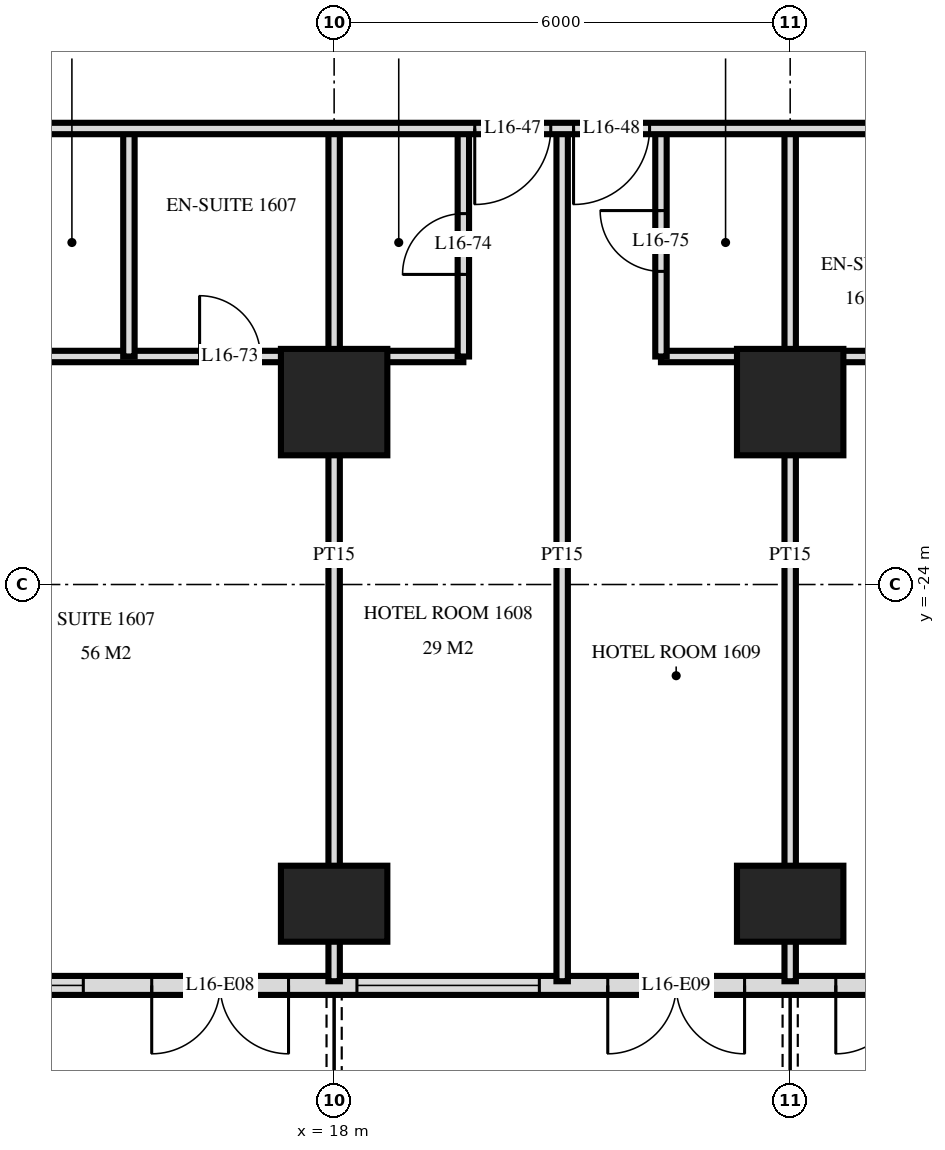
"""IFC4 building model, lengths in metres.
Left out: names, types, materials, properties, quantities, classifications, styles, units other than length and angle.
Written with IfcOpenShell. Run it as: python <this file> out.ifc"""

import sys

from ifc_helpers import new_model, si_unit, direction, frame, frame_2d, origin, origin_2d, place, context, subcontext, project, spatial, rectangle, extrude, element, fill, save


model = new_model("IFC4")
c1 = context("Model", 3, precision=1e-05, world=origin(), true_north=direction((0.0, 1.0)))
c2 = subcontext(c1, "Body", "Model", "MODEL_VIEW")
j1 = project(units=[si_unit("LENGTHUNIT", "METRE"), si_unit("PLANEANGLEUNIT", "RADIAN")], contexts=[c1])
p1 = place(None, origin())
s1 = spatial("IfcSite", under=j1, at=p1, CompositionType="ELEMENT")
p2 = place(p1, origin())
s2 = spatial("IfcBuilding", under=s1, at=p2, CompositionType="ELEMENT")
p3 = place(p2, frame((0.0, 0.0, 67.2)))
s3 = spatial("IfcBuildingStorey", under=s2, at=p3, CompositionType="ELEMENT", Elevation=67.2)
p4 = place(p3, frame((18.0, -28.2, 0.0), z_axis=(0.0, 0.0, 1.0), x_axis=(1.0, 0.0, 0.0)))
e1 = element("IfcColumn", 1, at=p4, inside=s3, PredefinedType="COLUMN", context=c2, shape_type="SweptSolid", body=[
    extrude(rectangle(XDim=1.4, YDim=1.0, at=origin_2d()), origin(), (0.0, 0.0, 1.0), 3.6),
])
p5 = place(p3, frame((18.0, -21.6, 0.0), z_axis=(0.0, 0.0, 1.0), x_axis=(1.0, 0.0, 0.0)))
e2 = element("IfcColumn", 2, at=p5, inside=s3, PredefinedType="COLUMN", context=c2, shape_type="SweptSolid", body=[
    extrude(rectangle(XDim=1.4, YDim=1.4, at=origin_2d()), origin(), (0.0, 0.0, 1.0), 3.6),
])
p6 = place(p3, frame((24.0, -28.2, 0.0), z_axis=(0.0, 0.0, 1.0), x_axis=(1.0, 0.0, 0.0)))
e3 = element("IfcColumn", 3, at=p6, inside=s3, PredefinedType="COLUMN", context=c2, shape_type="SweptSolid", body=[
    extrude(rectangle(XDim=1.4, YDim=1.0, at=origin_2d()), origin(), (0.0, 0.0, 1.0), 3.6),
])
p7 = place(p3, frame((24.0, -21.6, 0.0), z_axis=(0.0, 0.0, 1.0), x_axis=(1.0, 0.0, 0.0)))
e4 = element("IfcColumn", 4, at=p7, inside=s3, PredefinedType="COLUMN", context=c2, shape_type="SweptSolid", body=[
    extrude(rectangle(XDim=1.4, YDim=1.4, at=origin_2d()), origin(), (0.0, 0.0, 1.0), 3.6),
])
p8 = place(p3, frame((-28.775, -29.275, 0.0), z_axis=(0.0, 0.0, 1.0), x_axis=(1.0, 0.0, 0.0)))
e5 = element("IfcWall", 5, at=p8, inside=s3, PredefinedType="SOLIDWALL", context=c2, shape_type="SweptSolid", body=[
    extrude(rectangle(XDim=57.551, YDim=0.25, at=frame_2d((28.775, 0.0))), origin(), (0.0, 0.0, 1.0), 3.32),
])
p9 = place(p8, frame((0.575, 0.0, 0.0)))
e6 = element("IfcOpeningElement", 6, at=p9, cuts=e5, PredefinedType="OPENING", context=c2, shape_type="SweptSolid", body=[
    extrude(rectangle(XDim=1.8, YDim=2.4, at=frame_2d((0.9, 1.2))), frame((0.0, 0.135, 0.0), z_axis=(0.0, -1.0, 0.0), x_axis=(1.0, 0.0, 0.0)), (0.0, 0.0, 1.0), 0.27),
])
p10 = place(p8, frame((5.075, 0.0, 0.3)))
e7 = element("IfcOpeningElement", 7, at=p10, cuts=e5, PredefinedType="OPENING", context=c2, shape_type="SweptSolid", body=[
    extrude(rectangle(XDim=2.4, YDim=2.1, at=frame_2d((1.2, 1.05))), frame((0.0, 0.135, 0.0), z_axis=(0.0, -1.0, 0.0), x_axis=(1.0, 0.0, 0.0)), (0.0, 0.0, 1.0), 0.27),
])
p11 = place(p8, frame((8.375, 0.0, 0.0)))
e8 = element("IfcOpeningElement", 8, at=p11, cuts=e5, PredefinedType="OPENING", context=c2, shape_type="SweptSolid", body=[
    extrude(rectangle(XDim=1.8, YDim=2.4, at=frame_2d((0.9, 1.2))), frame((0.0, 0.135, 0.0), z_axis=(0.0, -1.0, 0.0), x_axis=(1.0, 0.0, 0.0)), (0.0, 0.0, 1.0), 0.27),
])
p12 = place(p8, frame((11.375, 0.0, 0.0)))
e9 = element("IfcOpeningElement", 9, at=p12, cuts=e5, PredefinedType="OPENING", context=c2, shape_type="SweptSolid", body=[
    extrude(rectangle(XDim=1.8, YDim=2.4, at=frame_2d((0.9, 1.2))), frame((0.0, 0.135, 0.0), z_axis=(0.0, -1.0, 0.0), x_axis=(1.0, 0.0, 0.0)), (0.0, 0.0, 1.0), 0.27),
])
p13 = place(p8, frame((14.075, 0.0, 0.3)))
e10 = element("IfcOpeningElement", 10, at=p13, cuts=e5, PredefinedType="OPENING", context=c2, shape_type="SweptSolid", body=[
    extrude(rectangle(XDim=2.4, YDim=2.1, at=frame_2d((1.2, 1.05))), frame((0.0, 0.135, 0.0), z_axis=(0.0, -1.0, 0.0), x_axis=(1.0, 0.0, 0.0)), (0.0, 0.0, 1.0), 0.27),
])
p14 = place(p8, frame((17.375, 0.0, 0.0)))
e11 = element("IfcOpeningElement", 11, at=p14, cuts=e5, PredefinedType="OPENING", context=c2, shape_type="SweptSolid", body=[
    extrude(rectangle(XDim=1.8, YDim=2.4, at=frame_2d((0.9, 1.2))), frame((0.0, 0.135, 0.0), z_axis=(0.0, -1.0, 0.0), x_axis=(1.0, 0.0, 0.0)), (0.0, 0.0, 1.0), 0.27),
])
p15 = place(p8, frame((20.075, 0.0, 0.3)))
e12 = element("IfcOpeningElement", 12, at=p15, cuts=e5, PredefinedType="OPENING", context=c2, shape_type="SweptSolid", body=[
    extrude(rectangle(XDim=2.4, YDim=2.1, at=frame_2d((1.2, 1.05))), frame((0.0, 0.135, 0.0), z_axis=(0.0, -1.0, 0.0), x_axis=(1.0, 0.0, 0.0)), (0.0, 0.0, 1.0), 0.27),
])
p16 = place(p8, frame((23.075, 0.0, 0.3)))
e13 = element("IfcOpeningElement", 13, at=p16, cuts=e5, PredefinedType="OPENING", context=c2, shape_type="SweptSolid", body=[
    extrude(rectangle(XDim=2.4, YDim=2.1, at=frame_2d((1.2, 1.05))), frame((0.0, 0.135, 0.0), z_axis=(0.0, -1.0, 0.0), x_axis=(1.0, 0.0, 0.0)), (0.0, 0.0, 1.0), 0.27),
])
p17 = place(p8, frame((26.375, 0.0, 0.0)))
e14 = element("IfcOpeningElement", 14, at=p17, cuts=e5, PredefinedType="OPENING", context=c2, shape_type="SweptSolid", body=[
    extrude(rectangle(XDim=1.8, YDim=2.4, at=frame_2d((0.9, 1.2))), frame((0.0, 0.135, 0.0), z_axis=(0.0, -1.0, 0.0), x_axis=(1.0, 0.0, 0.0)), (0.0, 0.0, 1.0), 0.27),
])
p18 = place(p8, frame((29.375, 0.0, 0.0)))
e15 = element("IfcOpeningElement", 15, at=p18, cuts=e5, PredefinedType="OPENING", context=c2, shape_type="SweptSolid", body=[
    extrude(rectangle(XDim=1.8, YDim=2.4, at=frame_2d((0.9, 1.2))), frame((0.0, 0.135, 0.0), z_axis=(0.0, -1.0, 0.0), x_axis=(1.0, 0.0, 0.0)), (0.0, 0.0, 1.0), 0.27),
])
p19 = place(p8, frame((32.075, 0.0, 0.3)))
e16 = element("IfcOpeningElement", 16, at=p19, cuts=e5, PredefinedType="OPENING", context=c2, shape_type="SweptSolid", body=[
    extrude(rectangle(XDim=2.4, YDim=2.1, at=frame_2d((1.2, 1.05))), frame((0.0, 0.135, 0.0), z_axis=(0.0, -1.0, 0.0), x_axis=(1.0, 0.0, 0.0)), (0.0, 0.0, 1.0), 0.27),
])
p20 = place(p8, frame((35.375, 0.0, 0.0)))
e17 = element("IfcOpeningElement", 17, at=p20, cuts=e5, PredefinedType="OPENING", context=c2, shape_type="SweptSolid", body=[
    extrude(rectangle(XDim=1.8, YDim=2.4, at=frame_2d((0.9, 1.2))), frame((0.0, 0.135, 0.0), z_axis=(0.0, -1.0, 0.0), x_axis=(1.0, 0.0, 0.0)), (0.0, 0.0, 1.0), 0.27),
])
p21 = place(p8, frame((38.075, 0.0, 0.3)))
e18 = element("IfcOpeningElement", 18, at=p21, cuts=e5, PredefinedType="OPENING", context=c2, shape_type="SweptSolid", body=[
    extrude(rectangle(XDim=2.4, YDim=2.1, at=frame_2d((1.2, 1.05))), frame((0.0, 0.135, 0.0), z_axis=(0.0, -1.0, 0.0), x_axis=(1.0, 0.0, 0.0)), (0.0, 0.0, 1.0), 0.27),
])
p22 = place(p8, frame((41.075, 0.0, 0.3)))
e19 = element("IfcOpeningElement", 19, at=p22, cuts=e5, PredefinedType="OPENING", context=c2, shape_type="SweptSolid", body=[
    extrude(rectangle(XDim=2.4, YDim=2.1, at=frame_2d((1.2, 1.05))), frame((0.0, 0.135, 0.0), z_axis=(0.0, -1.0, 0.0), x_axis=(1.0, 0.0, 0.0)), (0.0, 0.0, 1.0), 0.27),
])
p23 = place(p8, frame((44.375, 0.0, 0.0)))
e20 = element("IfcOpeningElement", 20, at=p23, cuts=e5, PredefinedType="OPENING", context=c2, shape_type="SweptSolid", body=[
    extrude(rectangle(XDim=1.8, YDim=2.4, at=frame_2d((0.9, 1.2))), frame((0.0, 0.135, 0.0), z_axis=(0.0, -1.0, 0.0), x_axis=(1.0, 0.0, 0.0)), (0.0, 0.0, 1.0), 0.27),
])
p24 = place(p8, frame((47.075, 0.0, 0.3)))
e21 = element("IfcOpeningElement", 21, at=p24, cuts=e5, PredefinedType="OPENING", context=c2, shape_type="SweptSolid", body=[
    extrude(rectangle(XDim=2.4, YDim=2.1, at=frame_2d((1.2, 1.05))), frame((0.0, 0.135, 0.0), z_axis=(0.0, -1.0, 0.0), x_axis=(1.0, 0.0, 0.0)), (0.0, 0.0, 1.0), 0.27),
])
p25 = place(p8, frame((50.375, 0.0, 0.0)))
e22 = element("IfcOpeningElement", 22, at=p25, cuts=e5, PredefinedType="OPENING", context=c2, shape_type="SweptSolid", body=[
    extrude(rectangle(XDim=1.8, YDim=2.4, at=frame_2d((0.9, 1.2))), frame((0.0, 0.135, 0.0), z_axis=(0.0, -1.0, 0.0), x_axis=(1.0, 0.0, 0.0)), (0.0, 0.0, 1.0), 0.27),
])
p26 = place(p8, frame((53.375, 0.0, 0.0)))
e23 = element("IfcOpeningElement", 23, at=p26, cuts=e5, PredefinedType="OPENING", context=c2, shape_type="SweptSolid", body=[
    extrude(rectangle(XDim=1.8, YDim=2.4, at=frame_2d((0.9, 1.2))), frame((0.0, 0.135, 0.0), z_axis=(0.0, -1.0, 0.0), x_axis=(1.0, 0.0, 0.0)), (0.0, 0.0, 1.0), 0.27),
])
p27 = place(p3, frame((24.0, -29.22, 0.0), z_axis=(0.0, 0.0, 1.0), x_axis=(0.0, 1.0, 0.0)))
e24 = element("IfcWall", 24, at=p27, inside=s3, PredefinedType="PARTITIONING", context=c2, shape_type="SweptSolid", body=[
    extrude(rectangle(XDim=11.22, YDim=0.15, at=frame_2d((5.61, 0.0))), origin(), (0.0, 0.0, 1.0), 3.32),
])
p28 = place(p3, frame((22.3, -21.0, 0.0), z_axis=(0.0, 0.0, 1.0), x_axis=(0.0, 1.0, 0.0)))
e25 = element("IfcWall", 25, at=p28, inside=s3, PredefinedType="PARTITIONING", context=c2, shape_type="SweptSolid", body=[
    extrude(rectangle(XDim=3.0, YDim=0.15, at=frame_2d((1.5, 0.0))), origin(), (0.0, 0.0, 1.0), 3.32),
])
p29 = place(p28, frame((1.12, 0.0, 0.0)))
e26 = element("IfcOpeningElement", 26, at=p29, cuts=e25, PredefinedType="OPENING", context=c2, shape_type="SweptSolid", body=[
    extrude(rectangle(XDim=0.8, YDim=2.1, at=frame_2d((0.4, 1.05))), frame((0.0, 0.085, 0.0), z_axis=(0.0, -1.0, 0.0), x_axis=(1.0, 0.0, 0.0)), (0.0, 0.0, 1.0), 0.17),
])
p30 = place(p3, frame((21.0, -29.22, 0.0), z_axis=(0.0, 0.0, 1.0), x_axis=(0.0, 1.0, 0.0)))
e27 = element("IfcWall", 27, at=p30, inside=s3, PredefinedType="PARTITIONING", context=c2, shape_type="SweptSolid", body=[
    extrude(rectangle(XDim=11.22, YDim=0.15, at=frame_2d((5.61, 0.0))), origin(), (0.0, 0.0, 1.0), 3.32),
])
p31 = place(p3, frame((19.7, -21.0, 0.0), z_axis=(0.0, 0.0, 1.0), x_axis=(0.0, 1.0, 0.0)))
e28 = element("IfcWall", 28, at=p31, inside=s3, PredefinedType="PARTITIONING", context=c2, shape_type="SweptSolid", body=[
    extrude(rectangle(XDim=3.0, YDim=0.15, at=frame_2d((1.5, 0.0))), origin(), (0.0, 0.0, 1.0), 3.32),
])
p32 = place(p31, frame((1.08, 0.0, 0.0)))
e29 = element("IfcOpeningElement", 29, at=p32, cuts=e28, PredefinedType="OPENING", context=c2, shape_type="SweptSolid", body=[
    extrude(rectangle(XDim=0.8, YDim=2.1, at=frame_2d((0.4, 1.05))), frame((0.0, 0.085, 0.0), z_axis=(0.0, -1.0, 0.0), x_axis=(1.0, 0.0, 0.0)), (0.0, 0.0, 1.0), 0.17),
])
p33 = place(p3, frame((18.0, -29.22, 0.0), z_axis=(0.0, 0.0, 1.0), x_axis=(0.0, 1.0, 0.0)))
e30 = element("IfcWall", 30, at=p33, inside=s3, PredefinedType="PARTITIONING", context=c2, shape_type="SweptSolid", body=[
    extrude(rectangle(XDim=11.22, YDim=0.15, at=frame_2d((5.61, 0.0))), origin(), (0.0, 0.0, 1.0), 3.32),
])
p34 = place(p3, frame((15.3, -21.0, 0.0), z_axis=(0.0, 0.0, 1.0), x_axis=(0.0, 1.0, 0.0)))
e31 = element("IfcWall", 31, at=p34, inside=s3, PredefinedType="PARTITIONING", context=c2, shape_type="SweptSolid", body=[
    extrude(rectangle(XDim=3.0, YDim=0.15, at=frame_2d((1.5, 0.0))), origin(), (0.0, 0.0, 1.0), 3.32),
])
p35 = place(p3, frame((13.8, -21.0, 0.0), z_axis=(0.0, 0.0, 1.0), x_axis=(1.0, 0.0, 0.0)))
e32 = element("IfcWall", 32, at=p35, inside=s3, PredefinedType="PARTITIONING", context=c2, shape_type="SweptSolid", body=[
    extrude(rectangle(XDim=5.9, YDim=0.15, at=frame_2d((2.95, 0.0))), origin(), (0.0, 0.0, 1.0), 3.32),
])
p36 = place(p35, frame((2.43, 0.0, 0.0)))
e33 = element("IfcOpeningElement", 33, at=p36, cuts=e32, PredefinedType="OPENING", context=c2, shape_type="SweptSolid", body=[
    extrude(rectangle(XDim=0.8, YDim=2.1, at=frame_2d((0.4, 1.05))), frame((0.0, 0.085, 0.0), z_axis=(0.0, -1.0, 0.0), x_axis=(1.0, 0.0, 0.0)), (0.0, 0.0, 1.0), 0.17),
])
p37 = place(p3, frame((22.3, -21.0, 0.0), z_axis=(0.0, 0.0, 1.0), x_axis=(1.0, 0.0, 0.0)))
e34 = element("IfcWall", 34, at=p37, inside=s3, PredefinedType="PARTITIONING", context=c2, shape_type="SweptSolid", body=[
    extrude(rectangle(XDim=4.7, YDim=0.15, at=frame_2d((2.35, 0.0))), origin(), (0.0, 0.0, 1.0), 3.32),
])
p38 = place(p3, frame((-33.12, -18.0, 0.0), z_axis=(0.0, 0.0, 1.0), x_axis=(1.0, 0.0, 0.0)))
e35 = element("IfcWall", 35, at=p38, inside=s3, PredefinedType="PARTITIONING", context=c2, shape_type="SweptSolid", body=[
    extrude(rectangle(XDim=66.24, YDim=0.15, at=frame_2d((33.12, 0.0))), origin(), (0.0, 0.0, 1.0), 3.32),
])
p39 = place(p38, frame((15.27, 0.0, 0.0)))
e36 = element("IfcOpeningElement", 36, at=p39, cuts=e35, PredefinedType="OPENING", context=c2, shape_type="SweptSolid", body=[
    extrude(rectangle(XDim=1.0, YDim=2.1, at=frame_2d((0.5, 1.05))), frame((0.0, 0.085, 0.0), z_axis=(0.0, -1.0, 0.0), x_axis=(1.0, 0.0, 0.0)), (0.0, 0.0, 1.0), 0.17),
])
p40 = place(p38, frame((21.22, 0.0, 0.0)))
e37 = element("IfcOpeningElement", 37, at=p40, cuts=e35, PredefinedType="OPENING", context=c2, shape_type="SweptSolid", body=[
    extrude(rectangle(XDim=1.0, YDim=2.1, at=frame_2d((0.5, 1.05))), frame((0.0, 0.085, 0.0), z_axis=(0.0, -1.0, 0.0), x_axis=(1.0, 0.0, 0.0)), (0.0, 0.0, 1.0), 0.17),
])
p41 = place(p38, frame((24.27, 0.0, 0.0)))
e38 = element("IfcOpeningElement", 38, at=p41, cuts=e35, PredefinedType="OPENING", context=c2, shape_type="SweptSolid", body=[
    extrude(rectangle(XDim=1.0, YDim=2.1, at=frame_2d((0.5, 1.05))), frame((0.0, 0.085, 0.0), z_axis=(0.0, -1.0, 0.0), x_axis=(1.0, 0.0, 0.0)), (0.0, 0.0, 1.0), 0.17),
])
p42 = place(p38, frame((30.97, 0.0, 0.0)))
e39 = element("IfcOpeningElement", 39, at=p42, cuts=e35, PredefinedType="OPENING", context=c2, shape_type="SweptSolid", body=[
    extrude(rectangle(XDim=1.0, YDim=2.1, at=frame_2d((0.5, 1.05))), frame((0.0, 0.085, 0.0), z_axis=(0.0, -1.0, 0.0), x_axis=(1.0, 0.0, 0.0)), (0.0, 0.0, 1.0), 0.17),
])
p43 = place(p38, frame((40.42, 0.0, 0.0)))
e40 = element("IfcOpeningElement", 40, at=p43, cuts=e35, PredefinedType="OPENING", context=c2, shape_type="SweptSolid", body=[
    extrude(rectangle(XDim=1.0, YDim=2.1, at=frame_2d((0.5, 1.05))), frame((0.0, 0.085, 0.0), z_axis=(0.0, -1.0, 0.0), x_axis=(1.0, 0.0, 0.0)), (0.0, 0.0, 1.0), 0.17),
])
p44 = place(p38, frame((43.97, 0.0, 0.0)))
e41 = element("IfcOpeningElement", 41, at=p44, cuts=e35, PredefinedType="OPENING", context=c2, shape_type="SweptSolid", body=[
    extrude(rectangle(XDim=1.0, YDim=2.1, at=frame_2d((0.5, 1.05))), frame((0.0, 0.085, 0.0), z_axis=(0.0, -1.0, 0.0), x_axis=(1.0, 0.0, 0.0)), (0.0, 0.0, 1.0), 0.17),
])
p45 = place(p38, frame((45.52, 0.0, 0.0)))
e42 = element("IfcOpeningElement", 42, at=p45, cuts=e35, PredefinedType="OPENING", context=c2, shape_type="SweptSolid", body=[
    extrude(rectangle(XDim=1.0, YDim=2.1, at=frame_2d((0.5, 1.05))), frame((0.0, 0.085, 0.0), z_axis=(0.0, -1.0, 0.0), x_axis=(1.0, 0.0, 0.0)), (0.0, 0.0, 1.0), 0.17),
])
p46 = place(p38, frame((52.97, 0.0, 0.0)))
e43 = element("IfcOpeningElement", 43, at=p46, cuts=e35, PredefinedType="OPENING", context=c2, shape_type="SweptSolid", body=[
    extrude(rectangle(XDim=1.0, YDim=2.1, at=frame_2d((0.5, 1.05))), frame((0.0, 0.085, 0.0), z_axis=(0.0, -1.0, 0.0), x_axis=(1.0, 0.0, 0.0)), (0.0, 0.0, 1.0), 0.17),
])
p47 = place(p38, frame((54.27, 0.0, 0.0)))
e44 = element("IfcOpeningElement", 44, at=p47, cuts=e35, PredefinedType="OPENING", context=c2, shape_type="SweptSolid", body=[
    extrude(rectangle(XDim=1.0, YDim=2.1, at=frame_2d((0.5, 1.05))), frame((0.0, 0.085, 0.0), z_axis=(0.0, -1.0, 0.0), x_axis=(1.0, 0.0, 0.0)), (0.0, 0.0, 1.0), 0.17),
])
p48 = place(p38, frame((13.42, 0.0, 0.0)))
e45 = element("IfcOpeningElement", 45, at=p48, cuts=e35, PredefinedType="OPENING", context=c2, shape_type="SweptSolid", body=[
    extrude(rectangle(XDim=1.0, YDim=2.1, at=frame_2d((0.5, 1.05))), frame((0.0, 0.085, 0.0), z_axis=(0.0, -1.0, 0.0), x_axis=(1.0, 0.0, 0.0)), (0.0, 0.0, 1.0), 0.17),
])
p49 = place(p38, frame((60.82, 0.0, 0.0)))
e46 = element("IfcOpeningElement", 46, at=p49, cuts=e35, PredefinedType="OPENING", context=c2, shape_type="SweptSolid", body=[
    extrude(rectangle(XDim=1.0, YDim=2.1, at=frame_2d((0.5, 1.05))), frame((0.0, 0.085, 0.0), z_axis=(0.0, -1.0, 0.0), x_axis=(1.0, 0.0, 0.0)), (0.0, 0.0, 1.0), 0.17),
])
p50 = place(p22, origin())
e47 = element("IfcWindow", 47, at=p50, inside=s3, PartitioningType="SINGLE_PANEL", PredefinedType="WINDOW", context=c2, shape_type="SweptSolid", body=[
    extrude(rectangle(XDim=2.4, YDim=2.1, at=frame_2d((1.2, 1.05))), frame((0.0, 0.03, 0.0), z_axis=(0.0, -1.0, 0.0), x_axis=(1.0, 0.0, 0.0)), (0.0, 0.0, 1.0), 0.06),
])
fill(e19, e47)
p51 = place(p23, frame((0.9, 0.0, 0.0), z_axis=(0.0, 0.0, 1.0), x_axis=(-1.0, 0.0, 0.0)))
e48 = element("IfcDoor", 48, at=p51, inside=s3, OperationType="DOUBLE_DOOR_SINGLE_SWING", PredefinedType="DOOR", context=c2, shape_type="SweptSolid", body=[
    extrude(rectangle(XDim=1.8, YDim=2.4, at=frame_2d((0.0, 1.2))), frame((0.0, -0.025, 0.0), z_axis=(0.0, 1.0, 0.0), x_axis=(-1.0, 0.0, 0.0)), (0.0, 0.0, 1.0), 0.05),
])
fill(e20, e48)
p52 = place(p24, origin())
e49 = element("IfcWindow", 49, at=p52, inside=s3, PartitioningType="SINGLE_PANEL", PredefinedType="WINDOW", context=c2, shape_type="SweptSolid", body=[
    extrude(rectangle(XDim=2.4, YDim=2.1, at=frame_2d((1.2, 1.05))), frame((0.0, 0.03, 0.0), z_axis=(0.0, -1.0, 0.0), x_axis=(1.0, 0.0, 0.0)), (0.0, 0.0, 1.0), 0.06),
])
fill(e21, e49)
p53 = place(p25, frame((0.9, 0.0, 0.0), z_axis=(0.0, 0.0, 1.0), x_axis=(-1.0, 0.0, 0.0)))
e50 = element("IfcDoor", 50, at=p53, inside=s3, OperationType="DOUBLE_DOOR_SINGLE_SWING", PredefinedType="DOOR", context=c2, shape_type="SweptSolid", body=[
    extrude(rectangle(XDim=1.8, YDim=2.4, at=frame_2d((0.0, 1.2))), frame((0.0, -0.025, 0.0), z_axis=(0.0, 1.0, 0.0), x_axis=(-1.0, 0.0, 0.0)), (0.0, 0.0, 1.0), 0.05),
])
fill(e22, e50)
p54 = place(p26, frame((0.9, 0.0, 0.0), z_axis=(0.0, 0.0, 1.0), x_axis=(-1.0, 0.0, 0.0)))
e51 = element("IfcDoor", 51, at=p54, inside=s3, OperationType="DOUBLE_DOOR_SINGLE_SWING", PredefinedType="DOOR", context=c2, shape_type="SweptSolid", body=[
    extrude(rectangle(XDim=1.8, YDim=2.4, at=frame_2d((0.0, 1.2))), frame((0.0, -0.025, 0.0), z_axis=(0.0, 1.0, 0.0), x_axis=(-1.0, 0.0, 0.0)), (0.0, 0.0, 1.0), 0.05),
])
fill(e23, e51)
p55 = place(p46, frame((0.5, 0.0, 0.0), z_axis=(0.0, 0.0, 1.0), x_axis=(-1.0, 0.0, 0.0)))
e52 = element("IfcDoor", 52, at=p55, inside=s3, OperationType="SINGLE_SWING_LEFT", PredefinedType="DOOR", context=c2, shape_type="SweptSolid", body=[
    extrude(rectangle(XDim=1.0, YDim=2.1, at=frame_2d((0.0, 1.05))), frame((0.0, -0.025, 0.0), z_axis=(0.0, 1.0, 0.0), x_axis=(-1.0, 0.0, 0.0)), (0.0, 0.0, 1.0), 0.05),
])
fill(e43, e52)
p56 = place(p47, frame((0.5, 0.0, 0.0), z_axis=(0.0, 0.0, 1.0), x_axis=(-1.0, 0.0, 0.0)))
e53 = element("IfcDoor", 53, at=p56, inside=s3, OperationType="SINGLE_SWING_LEFT", PredefinedType="DOOR", context=c2, shape_type="SweptSolid", body=[
    extrude(rectangle(XDim=1.0, YDim=2.1, at=frame_2d((0.0, 1.05))), frame((0.0, -0.025, 0.0), z_axis=(0.0, 1.0, 0.0), x_axis=(-1.0, 0.0, 0.0)), (0.0, 0.0, 1.0), 0.05),
])
fill(e44, e53)
p57 = place(p36, origin())
e54 = element("IfcDoor", 54, at=p57, inside=s3, OperationType="SINGLE_SWING_RIGHT", PredefinedType="DOOR", context=c2, shape_type="SweptSolid", body=[
    extrude(rectangle(XDim=0.8, YDim=2.1, at=frame_2d((0.4, 1.05))), frame((0.0, 0.025, 0.0), z_axis=(0.0, -1.0, 0.0), x_axis=(1.0, 0.0, 0.0)), (0.0, 0.0, 1.0), 0.05),
])
fill(e33, e54)
p58 = place(p32, origin())
e55 = element("IfcDoor", 55, at=p58, inside=s3, OperationType="SINGLE_SWING_RIGHT", PredefinedType="DOOR", context=c2, shape_type="SweptSolid", body=[
    extrude(rectangle(XDim=0.8, YDim=2.1, at=frame_2d((0.4, 1.05))), frame((0.0, 0.025, 0.0), z_axis=(0.0, -1.0, 0.0), x_axis=(1.0, 0.0, 0.0)), (0.0, 0.0, 1.0), 0.05),
])
fill(e29, e55)
p59 = place(p29, origin())
e56 = element("IfcDoor", 56, at=p59, inside=s3, OperationType="SINGLE_SWING_LEFT", PredefinedType="DOOR", context=c2, shape_type="SweptSolid", body=[
    extrude(rectangle(XDim=0.8, YDim=2.1, at=frame_2d((0.4, 1.05))), frame((0.0, 0.025, 0.0), z_axis=(0.0, -1.0, 0.0), x_axis=(1.0, 0.0, 0.0)), (0.0, 0.0, 1.0), 0.05),
])
fill(e26, e56)
save(model, sys.argv[1])
